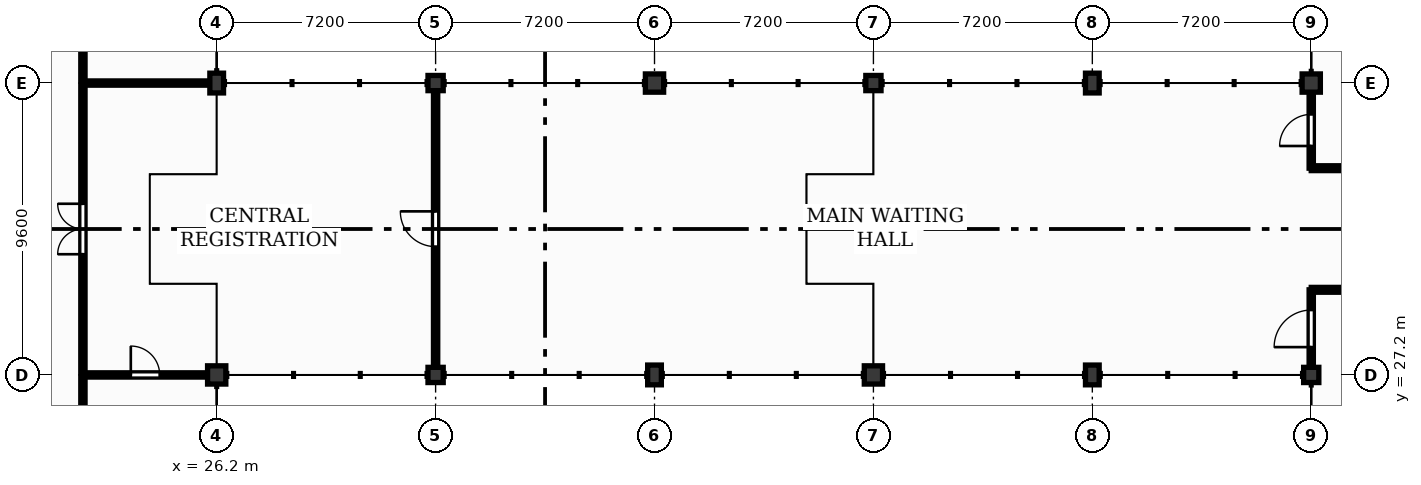
"""IFC4 building model, lengths in metres.
Left out: names, types, materials, properties, quantities, classifications, styles, units other than length and angle.
Written with IfcOpenShell. Run it as: python <this file> out.ifc"""

import sys

from ifc_helpers import new_model, si_unit, direction, frame, frame_2d, origin, origin_2d, place, context, subcontext, project, spatial, rectangle, extrude, element, fill, save


model = new_model("IFC4")
c1 = context("Model", 3, precision=1e-05, world=origin(), true_north=direction((0.0, 1.0)))
c2 = subcontext(c1, "Body", "Model", "MODEL_VIEW")
j1 = project(units=[si_unit("LENGTHUNIT", "METRE"), si_unit("PLANEANGLEUNIT", "RADIAN")], contexts=[c1])
p1 = place(None, origin())
s1 = spatial("IfcSite", under=j1, at=p1, CompositionType="ELEMENT")
p2 = place(p1, origin())
s2 = spatial("IfcBuilding", under=s1, at=p2, CompositionType="ELEMENT")
p3 = place(p2, origin())
s3 = spatial("IfcBuildingStorey", under=s2, at=p3, CompositionType="ELEMENT", Elevation=0.0)
p4 = place(p3, frame((26.2, 27.2, 0.0), z_axis=(0.0, 0.0, 1.0), x_axis=(1.0, 0.0, 0.0)))
e1 = element("IfcColumn", 1, at=p4, inside=s3, PredefinedType="COLUMN", context=c2, shape_type="SweptSolid", body=[
    extrude(rectangle(XDim=0.6, YDim=0.6, at=origin_2d()), origin(), (0.0, 0.0, 1.0), 4.2),
])
p5 = place(p3, frame((26.2, 36.8, 0.0), z_axis=(0.0, 0.0, 1.0), x_axis=(1.0, 0.0, 0.0)))
e2 = element("IfcColumn", 2, at=p5, inside=s3, PredefinedType="COLUMN", context=c2, shape_type="SweptSolid", body=[
    extrude(rectangle(XDim=0.45, YDim=0.65, at=origin_2d()), origin(), (0.0, 0.0, 1.0), 4.2),
])
for number, where, z_axis, x_axis in (
    (3, (33.4, 27.2, 0.0), (0.0, 0.0, 1.0), (1.0, 0.0, 0.0)),
    (4, (33.4, 36.8, 0.0), (0.0, 0.0, 1.0), (1.0, 0.0, 0.0)),
):
    element("IfcColumn", number, at=place(p3, frame(where, z_axis=z_axis, x_axis=x_axis)), inside=s3, PredefinedType="COLUMN", context=c2, shape_type="SweptSolid", body=[
        extrude(rectangle(XDim=0.5, YDim=0.5, at=origin_2d()), origin(), (0.0, 0.0, 1.0), 4.2),
    ])
p6 = place(p3, frame((40.6, 27.2, 0.0), z_axis=(0.0, 0.0, 1.0), x_axis=(1.0, 0.0, 0.0)))
e5 = element("IfcColumn", 5, at=p6, inside=s3, PredefinedType="COLUMN", context=c2, shape_type="SweptSolid", body=[
    extrude(rectangle(XDim=0.45, YDim=0.65, at=origin_2d()), origin(), (0.0, 0.0, 1.0), 4.2),
])
for number, where, z_axis, x_axis in (
    (6, (40.6, 36.8, 0.0), (0.0, 0.0, 1.0), (1.0, 0.0, 0.0)),
    (7, (47.8, 27.2, 0.0), (0.0, 0.0, 1.0), (1.0, 0.0, 0.0)),
):
    element("IfcColumn", number, at=place(p3, frame(where, z_axis=z_axis, x_axis=x_axis)), inside=s3, PredefinedType="COLUMN", context=c2, shape_type="SweptSolid", body=[
        extrude(rectangle(XDim=0.6, YDim=0.6, at=origin_2d()), origin(), (0.0, 0.0, 1.0), 4.2),
    ])
p7 = place(p3, frame((47.8, 36.8, 0.0), z_axis=(0.0, 0.0, 1.0), x_axis=(1.0, 0.0, 0.0)))
e8 = element("IfcColumn", 8, at=p7, inside=s3, PredefinedType="COLUMN", context=c2, shape_type="SweptSolid", body=[
    extrude(rectangle(XDim=0.5, YDim=0.5, at=origin_2d()), origin(), (0.0, 0.0, 1.0), 4.2),
])
for number, where, z_axis, x_axis in (
    (9, (55.0, 27.2, 0.0), (0.0, 0.0, 1.0), (1.0, 0.0, 0.0)),
    (10, (55.0, 36.8, 0.0), (0.0, 0.0, 1.0), (1.0, 0.0, 0.0)),
):
    element("IfcColumn", number, at=place(p3, frame(where, z_axis=z_axis, x_axis=x_axis)), inside=s3, PredefinedType="COLUMN", context=c2, shape_type="SweptSolid", body=[
        extrude(rectangle(XDim=0.45, YDim=0.65, at=origin_2d()), origin(), (0.0, 0.0, 1.0), 4.2),
    ])
p8 = place(p3, frame((62.2, 27.2, 0.0), z_axis=(0.0, 0.0, 1.0), x_axis=(1.0, 0.0, 0.0)))
e11 = element("IfcColumn", 11, at=p8, inside=s3, PredefinedType="COLUMN", context=c2, shape_type="SweptSolid", body=[
    extrude(rectangle(XDim=0.5, YDim=0.5, at=origin_2d()), origin(), (0.0, 0.0, 1.0), 4.2),
])
p9 = place(p3, frame((62.2, 36.8, 0.0), z_axis=(0.0, 0.0, 1.0), x_axis=(1.0, 0.0, 0.0)))
e12 = element("IfcColumn", 12, at=p9, inside=s3, PredefinedType="COLUMN", context=c2, shape_type="SweptSolid", body=[
    extrude(rectangle(XDim=0.6, YDim=0.6, at=origin_2d()), origin(), (0.0, 0.0, 1.0), 4.2),
])
p10 = place(p3, frame((21.8, 18.67, 0.0), z_axis=(0.0, 0.0, 1.0), x_axis=(0.0, 1.0, 0.0)))
e13 = element("IfcWall", 13, at=p10, inside=s3, PredefinedType="PARTITIONING", context=c2, shape_type="SweptSolid", body=[
    extrude(rectangle(XDim=8.46, YDim=0.14, at=frame_2d((4.23, 0.0))), origin(), (0.0, 0.0, 1.0), 4.18),
])
p11 = place(p10, frame((3.46, 0.0, 0.0)))
e14 = element("IfcOpeningElement", 14, at=p11, cuts=e13, PredefinedType="OPENING", context=c2, shape_type="SweptSolid", body=[
    extrude(rectangle(XDim=1.54, YDim=2.25, at=frame_2d((0.77, 1.125))), frame((0.0, 0.08, 0.0), z_axis=(0.0, -1.0, 0.0), x_axis=(1.0, 0.0, 0.0)), (0.0, 0.0, 1.0), 0.16),
])
p12 = place(p3, frame((21.8, 27.27, 0.0), z_axis=(0.0, 0.0, 1.0), x_axis=(0.0, 1.0, 0.0)))
e15 = element("IfcWall", 15, at=p12, inside=s3, PredefinedType="PARTITIONING", context=c2, shape_type="SweptSolid", body=[
    extrude(rectangle(XDim=9.46, YDim=0.14, at=frame_2d((4.73, 0.0))), origin(), (0.0, 0.0, 1.0), 4.18),
])
p13 = place(p12, frame((3.9, 0.0, 0.0)))
e16 = element("IfcOpeningElement", 16, at=p13, cuts=e15, PredefinedType="OPENING", context=c2, shape_type="SweptSolid", body=[
    extrude(rectangle(XDim=1.66, YDim=2.3, at=frame_2d((0.83, 1.15))), frame((0.0, 0.08, 0.0), z_axis=(0.0, -1.0, 0.0), x_axis=(1.0, 0.0, 0.0)), (0.0, 0.0, 1.0), 0.16),
])
p14 = place(p3, frame((21.8, 27.2, 0.0), z_axis=(0.0, 0.0, 1.0), x_axis=(1.0, 0.0, 0.0)))
e17 = element("IfcWall", 17, at=p14, inside=s3, PredefinedType="PARTITIONING", context=c2, shape_type="SweptSolid", body=[
    extrude(rectangle(XDim=4.1, YDim=0.14, at=frame_2d((2.05, 0.0))), origin(), (0.0, 0.0, 1.0), 3.6),
])
p15 = place(p14, frame((1.575, 0.0, 0.0)))
e18 = element("IfcOpeningElement", 18, at=p15, cuts=e17, PredefinedType="OPENING", context=c2, shape_type="SweptSolid", body=[
    extrude(rectangle(XDim=0.95, YDim=2.1, at=frame_2d((0.475, 1.05))), frame((0.0, 0.08, 0.0), z_axis=(0.0, -1.0, 0.0), x_axis=(1.0, 0.0, 0.0)), (0.0, 0.0, 1.0), 0.16),
])
p16 = place(p3, frame((21.8, 36.87, 0.0), z_axis=(0.0, 0.0, 1.0), x_axis=(0.0, 1.0, 0.0)))
e19 = element("IfcWall", 19, at=p16, inside=s3, PredefinedType="PARTITIONING", context=c2, shape_type="SweptSolid", body=[
    extrude(rectangle(XDim=8.46, YDim=0.14, at=frame_2d((4.23, 0.0))), origin(), (0.0, 0.0, 1.0), 4.18),
])
p17 = place(p16, frame((3.65, 0.0, 0.0)))
e20 = element("IfcOpeningElement", 20, at=p17, cuts=e19, PredefinedType="OPENING", context=c2, shape_type="SweptSolid", body=[
    extrude(rectangle(XDim=1.16, YDim=2.1, at=frame_2d((0.58, 1.05))), frame((0.0, 0.08, 0.0), z_axis=(0.0, -1.0, 0.0), x_axis=(1.0, 0.0, 0.0)), (0.0, 0.0, 1.0), 0.16),
])
p18 = place(p3, frame((21.8, 36.8, 0.0), z_axis=(0.0, 0.0, 1.0), x_axis=(1.0, 0.0, 0.0)))
e21 = element("IfcWall", 21, at=p18, inside=s3, PredefinedType="PARTITIONING", context=c2, shape_type="SweptSolid", body=[
    extrude(rectangle(XDim=4.175, YDim=0.14, at=frame_2d((2.087, 0.0))), origin(), (0.0, 0.0, 1.0), 3.5),
])
p19 = place(p3, frame((33.4, 27.45, 0.0), z_axis=(0.0, 0.0, 1.0), x_axis=(0.0, 1.0, 0.0)))
e22 = element("IfcWall", 22, at=p19, inside=s3, PredefinedType="PARTITIONING", context=c2, shape_type="SweptSolid", body=[
    extrude(rectangle(XDim=9.1, YDim=0.14, at=frame_2d((4.55, 0.0))), origin(), (0.0, 0.0, 1.0), 3.4),
])
p20 = place(p19, frame((3.97, 0.0, 0.0)))
e23 = element("IfcOpeningElement", 23, at=p20, cuts=e22, PredefinedType="OPENING", context=c2, shape_type="SweptSolid", body=[
    extrude(rectangle(XDim=1.16, YDim=2.1, at=frame_2d((0.58, 1.05))), frame((0.0, 0.08, 0.0), z_axis=(0.0, -1.0, 0.0), x_axis=(1.0, 0.0, 0.0)), (0.0, 0.0, 1.0), 0.16),
])
p21 = place(p3, frame((62.2, 27.45, 0.0), z_axis=(0.0, 0.0, 1.0), x_axis=(0.0, 1.0, 0.0)))
e24 = element("IfcWall", 24, at=p21, inside=s3, PredefinedType="PARTITIONING", context=c2, shape_type="SweptSolid", body=[
    extrude(rectangle(XDim=2.55, YDim=0.14, at=frame_2d((1.275, 0.0))), origin(), (0.0, 0.0, 1.0), 3.4),
])
p22 = place(p21, frame((0.665, 0.0, 0.0)))
e25 = element("IfcOpeningElement", 25, at=p22, cuts=e24, PredefinedType="OPENING", context=c2, shape_type="SweptSolid", body=[
    extrude(rectangle(XDim=1.22, YDim=2.1, at=frame_2d((0.61, 1.05))), frame((0.0, 0.08, 0.0), z_axis=(0.0, -1.0, 0.0), x_axis=(1.0, 0.0, 0.0)), (0.0, 0.0, 1.0), 0.16),
])
p23 = place(p3, frame((62.2, 34.0, 0.0), z_axis=(0.0, 0.0, 1.0), x_axis=(0.0, 1.0, 0.0)))
e26 = element("IfcWall", 26, at=p23, inside=s3, PredefinedType="PARTITIONING", context=c2, shape_type="SweptSolid", body=[
    extrude(rectangle(XDim=2.5, YDim=0.14, at=frame_2d((1.25, 0.0))), origin(), (0.0, 0.0, 1.0), 3.4),
])
p24 = place(p23, frame((0.73, 0.0, 0.0)))
e27 = element("IfcOpeningElement", 27, at=p24, cuts=e26, PredefinedType="OPENING", context=c2, shape_type="SweptSolid", body=[
    extrude(rectangle(XDim=1.04, YDim=2.1, at=frame_2d((0.52, 1.05))), frame((0.0, 0.08, 0.0), z_axis=(0.0, -1.0, 0.0), x_axis=(1.0, 0.0, 0.0)), (0.0, 0.0, 1.0), 0.16),
])
for number, where, z_axis, x_axis in (
    (28, (63.32, 30.0, 0.0), (0.0, 0.0, 1.0), (-1.0, 0.0, 0.0)),
    (29, (62.2, 34.0, 0.0), (0.0, 0.0, 1.0), (1.0, 0.0, 0.0)),
):
    element("IfcWall", number, at=place(p3, frame(where, z_axis=z_axis, x_axis=x_axis)), inside=s3, PredefinedType="PARTITIONING", context=c2, shape_type="SweptSolid", body=[
        extrude(rectangle(XDim=1.12, YDim=0.16, at=frame_2d((0.56, 0.0))), origin(), (0.0, 0.0, 1.0), 4.18),
    ])
p25 = place(p13, origin())
e30 = element("IfcDoor", 30, at=p25, inside=s3, OperationType="DOUBLE_DOOR_SINGLE_SWING", PredefinedType="DOOR", context=c2, shape_type="SweptSolid", body=[
    extrude(rectangle(XDim=1.66, YDim=2.3, at=frame_2d((0.83, 1.15))), frame((0.0, 0.025, 0.0), z_axis=(0.0, -1.0, 0.0), x_axis=(1.0, 0.0, 0.0)), (0.0, 0.0, 1.0), 0.05),
])
fill(e16, e30)
p26 = place(p22, origin())
e31 = element("IfcDoor", 31, at=p26, inside=s3, OperationType="SINGLE_SWING_LEFT", PredefinedType="DOOR", context=c2, shape_type="SweptSolid", body=[
    extrude(rectangle(XDim=1.22, YDim=2.1, at=frame_2d((0.61, 1.05))), frame((0.0, 0.025, 0.0), z_axis=(0.0, -1.0, 0.0), x_axis=(1.0, 0.0, 0.0)), (0.0, 0.0, 1.0), 0.05),
])
fill(e25, e31)
p27 = place(p24, origin())
e32 = element("IfcDoor", 32, at=p27, inside=s3, OperationType="SINGLE_SWING_LEFT", PredefinedType="DOOR", context=c2, shape_type="SweptSolid", body=[
    extrude(rectangle(XDim=1.04, YDim=2.1, at=frame_2d((0.52, 1.05))), frame((0.0, 0.025, 0.0), z_axis=(0.0, -1.0, 0.0), x_axis=(1.0, 0.0, 0.0)), (0.0, 0.0, 1.0), 0.05),
])
fill(e27, e32)
p28 = place(p20, origin())
e33 = element("IfcDoor", 33, at=p28, inside=s3, OperationType="SINGLE_SWING_RIGHT", PredefinedType="DOOR", context=c2, shape_type="SweptSolid", body=[
    extrude(rectangle(XDim=1.16, YDim=2.1, at=frame_2d((0.58, 1.05))), frame((0.0, 0.025, 0.0), z_axis=(0.0, -1.0, 0.0), x_axis=(1.0, 0.0, 0.0)), (0.0, 0.0, 1.0), 0.05),
])
fill(e23, e33)
p29 = place(p15, origin())
e34 = element("IfcDoor", 34, at=p29, inside=s3, OperationType="SINGLE_SWING_LEFT", PredefinedType="DOOR", context=c2, shape_type="SweptSolid", body=[
    extrude(rectangle(XDim=0.95, YDim=2.1, at=frame_2d((0.475, 1.05))), frame((0.0, 0.025, 0.0), z_axis=(0.0, -1.0, 0.0), x_axis=(1.0, 0.0, 0.0)), (0.0, 0.0, 1.0), 0.05),
])
fill(e18, e34)
save(model, sys.argv[1])
